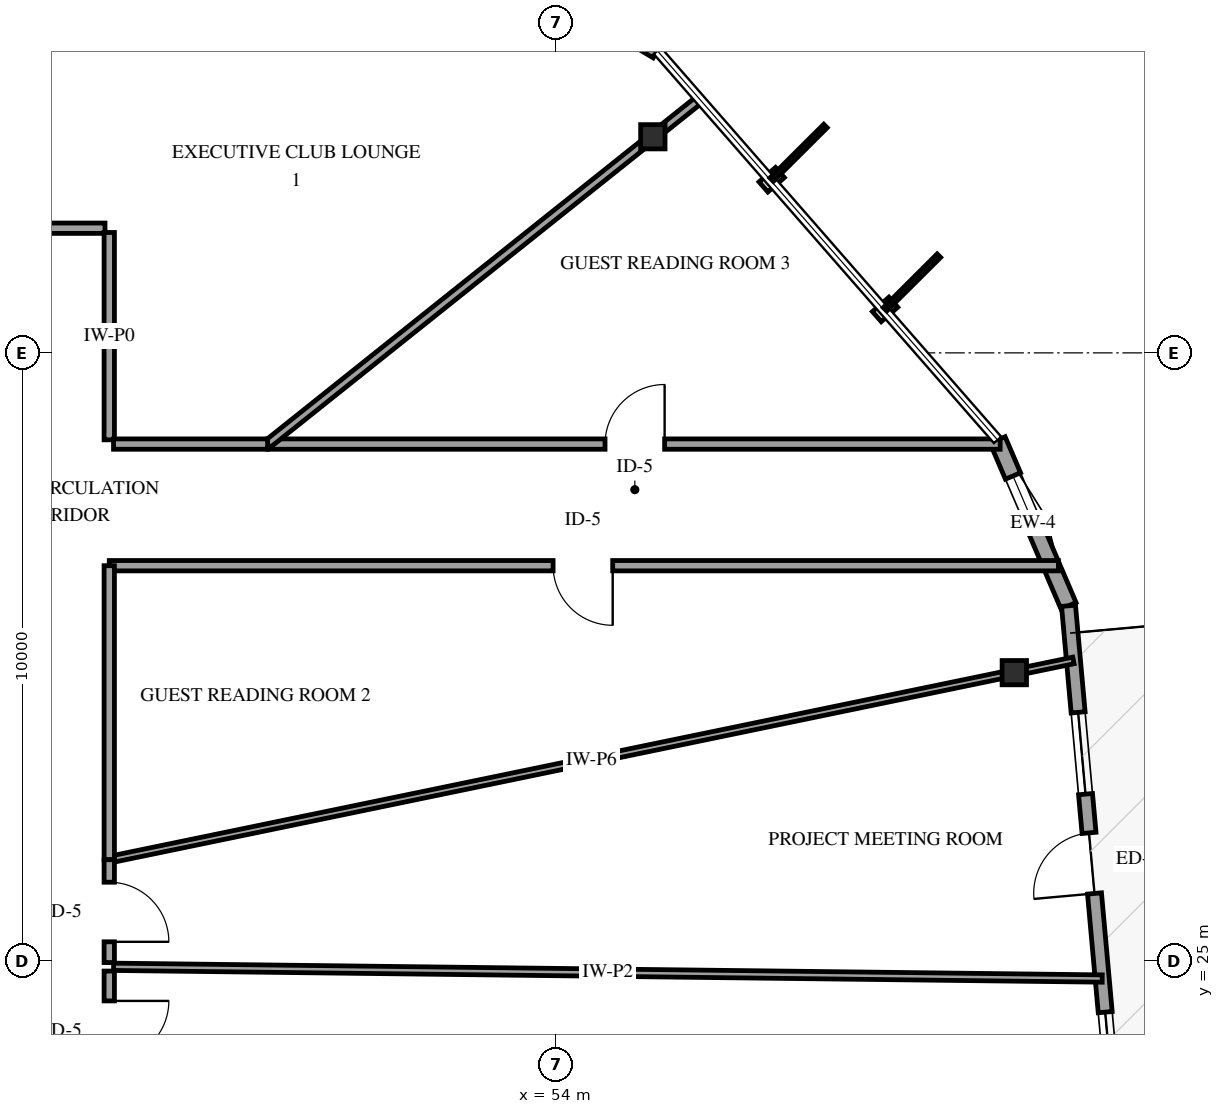
"""IFC4 building model, lengths in metres.
Left out: names, types, materials, properties, quantities, classifications, styles, units other than length and angle.
Written with IfcOpenShell. Run it as: python <this file> out.ifc"""

import sys

from ifc_helpers import new_model, si_unit, direction, frame, frame_2d, origin, origin_2d, place, context, subcontext, project, spatial, rectangle, i_section, extrude, element, fill, save


model = new_model("IFC4")
c1 = context("Model", 3, precision=1e-05, world=origin(), true_north=direction((0.0, 1.0)))
c2 = subcontext(c1, "Body", "Model", "MODEL_VIEW")
j1 = project(units=[si_unit("LENGTHUNIT", "METRE"), si_unit("PLANEANGLEUNIT", "RADIAN")], contexts=[c1])
p1 = place(None, origin())
s1 = spatial("IfcSite", under=j1, at=p1, CompositionType="ELEMENT")
p2 = place(p1, origin())
s2 = spatial("IfcBuilding", under=s1, at=p2, CompositionType="ELEMENT")
p3 = place(p2, frame((0.0, 0.0, 250.0)))
s3 = spatial("IfcBuildingStorey", under=s2, at=p3, CompositionType="ELEMENT", Elevation=250.0)
for number, where, z_axis, x_axis in (
    (1, (61.534, 29.741, 0.0), (0.0, 0.0, 1.0), (1.0, 0.0, 0.0)),
    (2, (55.589, 38.554, 0.0), (0.0, 0.0, 1.0), (1.0, 0.0, 0.0)),
):
    element("IfcColumn", number, at=place(p3, frame(where, z_axis=z_axis, x_axis=x_axis)), inside=s3, PredefinedType="COLUMN", context=c2, shape_type="SweptSolid", body=[
        extrude(i_section(OverallWidth=0.401, OverallDepth=0.399, WebThickness=0.025, FlangeThickness=0.04, FilletRadius=0.038, at=origin_2d()), origin(), (0.0, 0.0, 1.0), 3.75),
    ])
p4 = place(p3, frame((62.425, 30.841, 0.0), z_axis=(0.0, 0.0, 1.0), x_axis=(-0.393392799369, 0.919370494091, 0.0)))
e3 = element("IfcWall", 3, at=p4, inside=s3, PredefinedType="SOLIDWALL", context=c2, shape_type="SweptSolid", body=[
    extrude(rectangle(XDim=2.967, YDim=0.27, at=frame_2d((1.483, 0.0))), origin(), (0.0, 0.0, 1.0), 2.829),
])
p5 = place(p4, frame((1.422, 0.0, 0.75)))
e4 = element("IfcOpeningElement", 4, at=p5, cuts=e3, PredefinedType="OPENING", context=c2, shape_type="SweptSolid", body=[
    extrude(rectangle(XDim=0.9, YDim=1.5, at=frame_2d((0.45, 0.75))), frame((0.0, 0.145, 0.0), z_axis=(0.0, -1.0, 0.0), x_axis=(1.0, 0.0, 0.0)), (0.0, 0.0, 1.0), 0.29),
])
p6 = place(p3, frame((63.19, 22.375, 0.0), z_axis=(0.0, 0.0, 1.0), x_axis=(-0.089932307003, 0.995947880241, 0.0)))
e5 = element("IfcWall", 5, at=p6, inside=s3, PredefinedType="SOLIDWALL", context=c2, shape_type="SweptSolid", body=[
    extrude(rectangle(XDim=8.5, YDim=0.23, at=frame_2d((4.25, 0.0))), origin(), (0.0, 0.0, 1.0), 2.829),
])
p7 = place(p6, frame((3.75, 0.0, 0.0)))
e6 = element("IfcOpeningElement", 6, at=p7, cuts=e5, PredefinedType="OPENING", context=c2, shape_type="SweptSolid", body=[
    extrude(rectangle(XDim=1.0, YDim=2.15, at=frame_2d((0.5, 1.075))), frame((0.0, 0.125, 0.0), z_axis=(0.0, -1.0, 0.0), x_axis=(1.0, 0.0, 0.0)), (0.0, 0.0, 1.0), 0.25),
])
p8 = place(p6, frame((0.44, 0.0, 0.72)))
e7 = element("IfcOpeningElement", 7, at=p8, cuts=e5, PredefinedType="OPENING", context=c2, shape_type="SweptSolid", body=[
    extrude(rectangle(XDim=1.35, YDim=1.65, at=frame_2d((0.675, 0.825))), frame((0.0, 0.125, 0.0), z_axis=(0.0, -1.0, 0.0), x_axis=(1.0, 0.0, 0.0)), (0.0, 0.0, 1.0), 0.25),
])
p9 = place(p6, frame((5.39, 0.0, 0.72)))
e8 = element("IfcOpeningElement", 8, at=p9, cuts=e5, PredefinedType="OPENING", context=c2, shape_type="SweptSolid", body=[
    extrude(rectangle(XDim=1.35, YDim=1.65, at=frame_2d((0.675, 0.825))), frame((0.0, 0.125, 0.0), z_axis=(0.0, -1.0, 0.0), x_axis=(1.0, 0.0, 0.0)), (0.0, 0.0, 1.0), 0.25),
])
p10 = place(p3, frame((55.664, 39.968, 0.0), z_axis=(0.0, 0.0, 1.0), x_axis=(-0.858609177154, 0.512630745183, 0.0)))
e9 = element("IfcWall", 9, at=p10, inside=s3, PredefinedType="SOLIDWALL", context=c2, shape_type="SweptSolid", body=[
    extrude(rectangle(XDim=2.967, YDim=0.27, at=frame_2d((1.483, 0.0))), origin(), (0.0, 0.0, 1.0), 2.829),
])
p11 = place(p10, frame((1.033, 0.0, 0.75)))
e10 = element("IfcOpeningElement", 10, at=p11, cuts=e9, PredefinedType="OPENING", context=c2, shape_type="SweptSolid", body=[
    extrude(rectangle(XDim=0.9, YDim=1.5, at=frame_2d((0.45, 0.75))), frame((0.0, 0.145, 0.0), z_axis=(0.0, -1.0, 0.0), x_axis=(1.0, 0.0, 0.0)), (0.0, 0.0, 1.0), 0.29),
])
p12 = place(p3, frame((62.979, 24.711, 0.0), z_axis=(0.0, 0.0, 1.0), x_axis=(-0.999929462533, 0.011877287476, 0.0)))
e11 = element("IfcWall", 11, at=p12, inside=s3, PredefinedType="PARTITIONING", context=c2, shape_type="SweptSolid", body=[
    extrude(rectangle(XDim=16.259, YDim=0.12, at=frame_2d((8.13, 0.0))), origin(), (0.0, 0.0, 1.0), 3.45),
])
p13 = place(p3, frame((46.65, 26.665, 0.0), z_axis=(0.0, 0.0, 1.0), x_axis=(0.979306197495, 0.202384217636, 0.0)))
e12 = element("IfcWall", 12, at=p13, inside=s3, PredefinedType="PARTITIONING", context=c2, shape_type="SweptSolid", body=[
    extrude(rectangle(XDim=16.191, YDim=0.11, at=frame_2d((8.096, 0.0))), origin(), (0.0, 0.0, 1.0), 2.745),
])
p14 = place(p3, frame((62.259, 31.5, 0.0), z_axis=(0.0, 0.0, 1.0), x_axis=(-1.0, 0.0, 0.0)))
e13 = element("IfcWall", 13, at=p14, inside=s3, PredefinedType="PARTITIONING", context=c2, shape_type="SweptSolid", body=[
    extrude(rectangle(XDim=15.609, YDim=0.17, at=frame_2d((7.805, 0.0))), origin(), (0.0, 0.0, 1.0), 3.45),
])
p15 = place(p14, frame((7.33, 0.0, 0.0)))
e14 = element("IfcOpeningElement", 14, at=p15, cuts=e13, PredefinedType="OPENING", context=c2, shape_type="SweptSolid", body=[
    extrude(rectangle(XDim=0.98, YDim=2.15, at=frame_2d((0.49, 1.075))), frame((0.0, 0.095, 0.0), z_axis=(0.0, -1.0, 0.0), x_axis=(1.0, 0.0, 0.0)), (0.0, 0.0, 1.0), 0.19),
])
p16 = place(p3, frame((31.37, 37.05, 0.0), z_axis=(0.0, 0.0, 1.0), x_axis=(1.0, 0.0, 0.0)))
e15 = element("IfcWall", 15, at=p16, inside=s3, PredefinedType="PARTITIONING", context=c2, shape_type="SweptSolid", body=[
    extrude(rectangle(XDim=15.21, YDim=0.17, at=frame_2d((7.605, 0.0))), origin(), (0.0, 0.0, 1.0), 3.45),
])
p17 = place(p16, frame((7.13, 0.0, 0.0)))
e16 = element("IfcOpeningElement", 16, at=p17, cuts=e15, PredefinedType="OPENING", context=c2, shape_type="SweptSolid", body=[
    extrude(rectangle(XDim=0.98, YDim=2.15, at=frame_2d((0.49, 1.075))), frame((0.0, 0.095, 0.0), z_axis=(0.0, -1.0, 0.0), x_axis=(1.0, 0.0, 0.0)), (0.0, 0.0, 1.0), 0.19),
])
p18 = place(p3, frame((49.254, 33.5, 0.0), z_axis=(0.0, 0.0, 1.0), x_axis=(1.0, 0.0, 0.0)))
e17 = element("IfcWall", 17, at=p18, inside=s3, PredefinedType="PARTITIONING", context=c2, shape_type="SweptSolid", body=[
    extrude(rectangle(XDim=12.047, YDim=0.17, at=frame_2d((6.023, 0.0))), origin(), (0.0, 0.0, 1.0), 2.828),
])
p19 = place(p18, frame((5.549, 0.0, 0.0)))
e18 = element("IfcOpeningElement", 18, at=p19, cuts=e17, PredefinedType="OPENING", context=c2, shape_type="SweptSolid", body=[
    extrude(rectangle(XDim=0.98, YDim=2.15, at=frame_2d((0.49, 1.075))), frame((0.0, 0.095, 0.0), z_axis=(0.0, -1.0, 0.0), x_axis=(1.0, 0.0, 0.0)), (0.0, 0.0, 1.0), 0.19),
])
p20 = place(p3, frame((49.254, 33.5, 0.0), z_axis=(0.0, 0.0, 1.0), x_axis=(0.781716904538, 0.623633450963, 0.0)))
e19 = element("IfcWall", 19, at=p20, inside=s3, PredefinedType="PARTITIONING", context=c2, shape_type="SweptSolid", body=[
    extrude(rectangle(XDim=9.092, YDim=0.14, at=frame_2d((4.546, 0.0))), origin(), (0.0, 0.0, 1.0), 3.45),
])
p21 = place(p3, frame((46.65, 31.5, 0.0), z_axis=(0.0, 0.0, 1.0), x_axis=(0.0, -1.0, 0.0)))
e20 = element("IfcWall", 20, at=p21, inside=s3, PredefinedType="PARTITIONING", context=c2, shape_type="SweptSolid", body=[
    extrude(rectangle(XDim=4.835, YDim=0.17, at=frame_2d((2.417, 0.0))), origin(), (0.0, 0.0, 1.0), 3.45),
])
p22 = place(p3, frame((46.65, 36.98, 0.0), z_axis=(0.0, 0.0, 1.0), x_axis=(0.0, -1.0, 0.0)))
e21 = element("IfcWall", 21, at=p22, inside=s3, PredefinedType="PARTITIONING", context=c2, shape_type="SweptSolid", body=[
    extrude(rectangle(XDim=3.41, YDim=0.17, at=frame_2d((1.705, 0.0))), origin(), (0.0, 0.0, 1.0), 3.45),
])
p23 = place(p3, frame((46.72, 33.5, 0.0), z_axis=(0.0, 0.0, 1.0), x_axis=(1.0, 0.0, 0.0)))
e22 = element("IfcWall", 22, at=p23, inside=s3, PredefinedType="PARTITIONING", context=c2, shape_type="SweptSolid", body=[
    extrude(rectangle(XDim=2.534, YDim=0.17, at=frame_2d((1.267, 0.0))), origin(), (0.0, 0.0, 1.0), 3.45),
])
p24 = place(p3, frame((46.65, 24.834, 0.0), z_axis=(0.0, 0.0, 1.0), x_axis=(0.0, -1.0, 0.0)))
e23 = element("IfcWall", 23, at=p24, inside=s3, PredefinedType="PARTITIONING", context=c2, shape_type="SweptSolid", body=[
    extrude(rectangle(XDim=1.933, YDim=0.17, at=frame_2d((0.967, 0.0))), origin(), (0.0, 0.0, 1.0), 3.45),
])
p25 = place(p24, frame((0.491, 0.0, 0.0)))
e24 = element("IfcOpeningElement", 24, at=p25, cuts=e23, PredefinedType="OPENING", context=c2, shape_type="SweptSolid", body=[
    extrude(rectangle(XDim=0.98, YDim=2.15, at=frame_2d((0.49, 1.075))), frame((0.0, 0.095, 0.0), z_axis=(0.0, -1.0, 0.0), x_axis=(1.0, 0.0, 0.0)), (0.0, 0.0, 1.0), 0.19),
])
p26 = place(p3, frame((46.65, 26.665, 0.0), z_axis=(0.0, 0.0, 1.0), x_axis=(0.0, -1.0, 0.0)))
e25 = element("IfcWall", 25, at=p26, inside=s3, PredefinedType="PARTITIONING", context=c2, shape_type="SweptSolid", body=[
    extrude(rectangle(XDim=1.691, YDim=0.17, at=frame_2d((0.845, 0.0))), origin(), (0.0, 0.0, 1.0), 3.45),
])
p27 = place(p26, frame((0.37, 0.0, 0.0)))
e26 = element("IfcOpeningElement", 26, at=p27, cuts=e25, PredefinedType="OPENING", context=c2, shape_type="SweptSolid", body=[
    extrude(rectangle(XDim=0.98, YDim=2.15, at=frame_2d((0.49, 1.075))), frame((0.0, 0.095, 0.0), z_axis=(0.0, -1.0, 0.0), x_axis=(1.0, 0.0, 0.0)), (0.0, 0.0, 1.0), 0.19),
])
p28 = place(p5, origin())
e27 = element("IfcWindow", 27, at=p28, inside=s3, PartitioningType="SINGLE_PANEL", PredefinedType="WINDOW", context=c2, shape_type="SweptSolid", body=[
    extrude(rectangle(XDim=0.9, YDim=1.5, at=frame_2d((0.45, 0.75))), frame((0.0, 0.03, 0.0), z_axis=(0.0, -1.0, 0.0), x_axis=(1.0, 0.0, 0.0)), (0.0, 0.0, 1.0), 0.06),
])
fill(e4, e27)
p29 = place(p7, origin())
e28 = element("IfcDoor", 28, at=p29, inside=s3, OperationType="SINGLE_SWING_LEFT", PredefinedType="DOOR", context=c2, shape_type="SweptSolid", body=[
    extrude(rectangle(XDim=1.0, YDim=2.15, at=frame_2d((0.5, 1.075))), frame((0.0, 0.025, 0.0), z_axis=(0.0, -1.0, 0.0), x_axis=(1.0, 0.0, 0.0)), (0.0, 0.0, 1.0), 0.05),
])
fill(e6, e28)
p30 = place(p8, origin())
e29 = element("IfcWindow", 29, at=p30, inside=s3, PartitioningType="SINGLE_PANEL", PredefinedType="WINDOW", context=c2, shape_type="SweptSolid", body=[
    extrude(rectangle(XDim=1.35, YDim=1.65, at=frame_2d((0.675, 0.825))), frame((0.0, 0.03, 0.0), z_axis=(0.0, -1.0, 0.0), x_axis=(1.0, 0.0, 0.0)), (0.0, 0.0, 1.0), 0.06),
])
fill(e7, e29)
p31 = place(p9, origin())
e30 = element("IfcWindow", 30, at=p31, inside=s3, PartitioningType="SINGLE_PANEL", PredefinedType="WINDOW", context=c2, shape_type="SweptSolid", body=[
    extrude(rectangle(XDim=1.35, YDim=1.65, at=frame_2d((0.675, 0.825))), frame((0.0, 0.03, 0.0), z_axis=(0.0, -1.0, 0.0), x_axis=(1.0, 0.0, 0.0)), (0.0, 0.0, 1.0), 0.06),
])
fill(e8, e30)
p32 = place(p15, origin())
e31 = element("IfcDoor", 31, at=p32, inside=s3, OperationType="SINGLE_SWING_LEFT", PredefinedType="DOOR", context=c2, shape_type="SweptSolid", body=[
    extrude(rectangle(XDim=0.98, YDim=2.15, at=frame_2d((0.49, 1.075))), frame((0.0, 0.025, 0.0), z_axis=(0.0, -1.0, 0.0), x_axis=(1.0, 0.0, 0.0)), (0.0, 0.0, 1.0), 0.05),
])
fill(e14, e31)
p33 = place(p19, origin())
e32 = element("IfcDoor", 32, at=p33, inside=s3, OperationType="SINGLE_SWING_RIGHT", PredefinedType="DOOR", context=c2, shape_type="SweptSolid", body=[
    extrude(rectangle(XDim=0.98, YDim=2.15, at=frame_2d((0.49, 1.075))), frame((0.0, 0.025, 0.0), z_axis=(0.0, -1.0, 0.0), x_axis=(1.0, 0.0, 0.0)), (0.0, 0.0, 1.0), 0.05),
])
fill(e18, e32)
p34 = place(p25, origin())
e33 = element("IfcDoor", 33, at=p34, inside=s3, OperationType="SINGLE_SWING_LEFT", PredefinedType="DOOR", context=c2, shape_type="SweptSolid", body=[
    extrude(rectangle(XDim=0.98, YDim=2.15, at=frame_2d((0.49, 1.075))), frame((0.0, 0.025, 0.0), z_axis=(0.0, -1.0, 0.0), x_axis=(1.0, 0.0, 0.0)), (0.0, 0.0, 1.0), 0.05),
])
fill(e24, e33)
p35 = place(p27, origin())
e34 = element("IfcDoor", 34, at=p35, inside=s3, OperationType="SINGLE_SWING_RIGHT", PredefinedType="DOOR", context=c2, shape_type="SweptSolid", body=[
    extrude(rectangle(XDim=0.98, YDim=2.15, at=frame_2d((0.49, 1.075))), frame((0.0, 0.025, 0.0), z_axis=(0.0, -1.0, 0.0), x_axis=(1.0, 0.0, 0.0)), (0.0, 0.0, 1.0), 0.05),
])
fill(e26, e34)
save(model, sys.argv[1])
